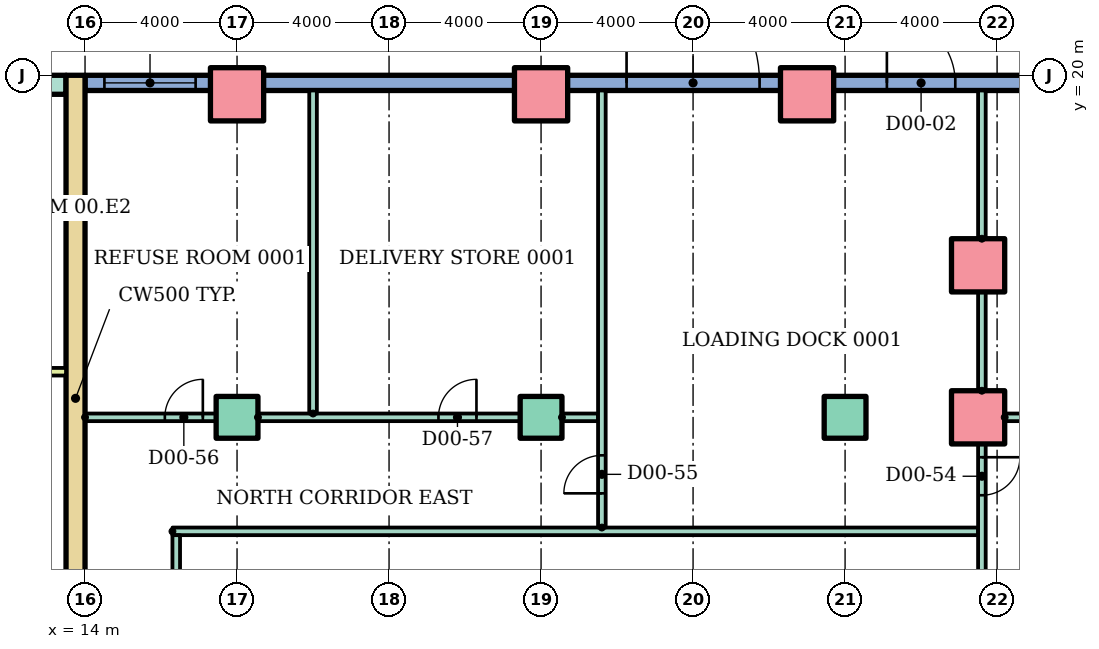
"""IFC4 building model, lengths in metres.
Left out: names, types, materials, properties, quantities, classifications, styles, units other than length and angle.
Written with IfcOpenShell. Run it as: python <this file> out.ifc"""

import sys

from ifc_helpers import new_model, si_unit, direction, frame, frame_2d, origin, origin_2d, place, context, subcontext, project, spatial, rectangle, hollow_rectangle, extrude, element, fill, save


model = new_model("IFC4")
c1 = context("Model", 3, precision=1e-05, world=origin(), true_north=direction((0.0, 1.0)))
c2 = subcontext(c1, "Body", "Model", "MODEL_VIEW")
j1 = project(units=[si_unit("LENGTHUNIT", "METRE"), si_unit("PLANEANGLEUNIT", "RADIAN")], contexts=[c1])
p1 = place(None, origin())
s1 = spatial("IfcSite", under=j1, at=p1, CompositionType="ELEMENT")
p2 = place(p1, origin())
s2 = spatial("IfcBuilding", under=s1, at=p2, CompositionType="ELEMENT")
p3 = place(p2, origin())
s3 = spatial("IfcBuildingStorey", under=s2, at=p3, CompositionType="ELEMENT", Elevation=0.0)
for number, where in (
    (1, (18.0, 11.0, 0.0)),
    (2, (26.0, 11.0, 0.0)),
    (3, (34.0, 11.0, 0.0)),
):
    element("IfcColumn", number, at=place(p3, frame(where)), inside=s3, PredefinedType="COLUMN", context=c2, shape_type="SweptSolid", body=[
        extrude(rectangle(XDim=1.1, YDim=1.1, at=origin_2d()), origin(), (0.0, 0.0, 1.0), 6.0),
    ])
for number, where in (
    (4, (37.5, 11.0, 0.0)),
    (5, (37.5, 15.0, 0.0)),
    (6, (18.0, 19.5, 0.0)),
    (7, (26.0, 19.5, 0.0)),
    (8, (33.0, 19.5, 0.0)),
):
    element("IfcColumn", number, at=place(p3, frame(where)), inside=s3, PredefinedType="COLUMN", context=c2, shape_type="SweptSolid", body=[
        extrude(hollow_rectangle(XDim=1.4, YDim=1.4, WallThickness=0.08, at=origin_2d()), origin(), (0.0, 0.0, 1.0), 6.0),
    ])
p4 = place(p3, frame((39.6, 19.8, 0.0), z_axis=(0.0, 0.0, 1.0), x_axis=(-1.0, 0.0, 0.0)))
e9 = element("IfcWall", 9, at=p4, inside=s3, PredefinedType="STANDARD", context=c2, shape_type="SweptSolid", body=[
    extrude(rectangle(XDim=25.6, YDim=0.4, at=frame_2d((12.8, 0.0))), origin(), (0.0, 0.0, 1.0), 5.7),
])
p5 = place(p4, frame((2.7, 0.0, 0.0)))
e10 = element("IfcOpeningElement", 10, at=p5, cuts=e9, PredefinedType="OPENING", context=c2, shape_type="SweptSolid", body=[
    extrude(rectangle(XDim=1.8, YDim=2.4, at=frame_2d((0.9, 1.2))), frame((0.0, 0.21, 0.0), z_axis=(0.0, -1.0, 0.0), x_axis=(1.0, 0.0, 0.0)), (0.0, 0.0, 1.0), 0.42),
])
p6 = place(p4, frame((22.69, 0.0, 0.9)))
e11 = element("IfcOpeningElement", 11, at=p6, cuts=e9, PredefinedType="OPENING", context=c2, shape_type="SweptSolid", body=[
    extrude(rectangle(XDim=2.4, YDim=2.4, at=frame_2d((1.2, 1.2))), frame((0.0, 0.21, 0.0), z_axis=(0.0, -1.0, 0.0), x_axis=(1.0, 0.0, 0.0)), (0.0, 0.0, 1.0), 0.42),
])
p7 = place(p4, frame((7.85, 0.0, 0.0)))
e12 = element("IfcOpeningElement", 12, at=p7, cuts=e9, PredefinedType="OPENING", context=c2, shape_type="SweptSolid", body=[
    extrude(rectangle(XDim=3.5, YDim=4.5, at=frame_2d((1.75, 2.25))), frame((0.0, 0.21, 0.0), z_axis=(0.0, -1.0, 0.0), x_axis=(1.0, 0.0, 0.0)), (0.0, 0.0, 1.0), 0.42),
])
p8 = place(p3, frame((13.75, 3.0, 0.0), z_axis=(0.0, 0.0, 1.0), x_axis=(0.0, 1.0, 0.0)))
e13 = element("IfcWall", 13, at=p8, inside=s3, PredefinedType="SHEAR", context=c2, shape_type="SweptSolid", body=[
    extrude(rectangle(XDim=17.0, YDim=0.5, at=frame_2d((8.5, 0.0))), origin(), (0.0, 0.0, 1.0), 5.7),
])
p9 = place(p3, frame((-13.5, 19.75, 0.0)))
e14 = element("IfcWall", 14, at=p9, inside=s3, PredefinedType="SHEAR", context=c2, shape_type="SweptSolid", body=[
    extrude(rectangle(XDim=27.0, YDim=0.5, at=frame_2d((13.5, 0.0))), origin(), (0.0, 0.0, 1.0), 5.7),
])
p10 = place(p9, frame((4.4, 0.0, 0.0)))
e15 = element("IfcOpeningElement", 15, at=p10, cuts=e14, PredefinedType="OPENING", context=c2, shape_type="SweptSolid", body=[
    extrude(rectangle(XDim=0.95, YDim=2.1, at=frame_2d((0.475, 1.05))), frame((0.0, 0.26, 0.0), z_axis=(0.0, -1.0, 0.0), x_axis=(1.0, 0.0, 0.0)), (0.0, 0.0, 1.0), 0.52),
])
p11 = place(p9, frame((10.4, 0.0, 0.0)))
e16 = element("IfcOpeningElement", 16, at=p11, cuts=e14, PredefinedType="OPENING", context=c2, shape_type="SweptSolid", body=[
    extrude(rectangle(XDim=0.95, YDim=2.1, at=frame_2d((0.475, 1.05))), frame((0.0, 0.26, 0.0), z_axis=(0.0, -1.0, 0.0), x_axis=(1.0, 0.0, 0.0)), (0.0, 0.0, 1.0), 0.52),
])
p12 = place(p9, frame((16.4, 0.0, 0.0)))
e17 = element("IfcOpeningElement", 17, at=p12, cuts=e14, PredefinedType="OPENING", context=c2, shape_type="SweptSolid", body=[
    extrude(rectangle(XDim=0.95, YDim=2.1, at=frame_2d((0.475, 1.05))), frame((0.0, 0.26, 0.0), z_axis=(0.0, -1.0, 0.0), x_axis=(1.0, 0.0, 0.0)), (0.0, 0.0, 1.0), 0.52),
])
p13 = place(p3, frame((9.6, 12.2, 0.0)))
e18 = element("IfcWall", 18, at=p13, inside=s3, PredefinedType="PARTITIONING", context=c2, shape_type="SweptSolid", body=[
    extrude(rectangle(XDim=3.9, YDim=0.2, at=frame_2d((1.95, 0.0))), origin(), (0.0, 0.0, 1.0), 5.7),
])
p14 = place(p3, frame((16.3, 8.0, 0.0)))
e19 = element("IfcWall", 19, at=p14, inside=s3, PredefinedType="PARTITIONING", context=c2, shape_type="SweptSolid", body=[
    extrude(rectangle(XDim=21.2, YDim=0.2, at=frame_2d((10.6, 0.0))), origin(), (0.0, 0.0, 1.0), 5.7),
])
p15 = place(p3, frame((14.0, 11.0, 0.0)))
e20 = element("IfcWall", 20, at=p15, inside=s3, PredefinedType="PARTITIONING", context=c2, shape_type="SweptSolid", body=[
    extrude(rectangle(XDim=3.45, YDim=0.2, at=frame_2d((1.725, 0.0))), origin(), (0.0, 0.0, 1.0), 5.7),
])
p16 = place(p15, frame((2.1, 0.0, 0.0)))
e21 = element("IfcOpeningElement", 21, at=p16, cuts=e20, PredefinedType="OPENING", context=c2, shape_type="SweptSolid", body=[
    extrude(rectangle(XDim=1.0, YDim=2.1, at=frame_2d((0.5, 1.05))), frame((0.0, 0.11, 0.0), z_axis=(0.0, -1.0, 0.0), x_axis=(1.0, 0.0, 0.0)), (0.0, 0.0, 1.0), 0.22),
])
p17 = place(p3, frame((18.55, 11.0, 0.0)))
e22 = element("IfcWall", 22, at=p17, inside=s3, PredefinedType="PARTITIONING", context=c2, shape_type="SweptSolid", body=[
    extrude(rectangle(XDim=6.9, YDim=0.2, at=frame_2d((3.45, 0.0))), origin(), (0.0, 0.0, 1.0), 5.7),
])
p18 = place(p17, frame((4.75, 0.0, 0.0)))
e23 = element("IfcOpeningElement", 23, at=p18, cuts=e22, PredefinedType="OPENING", context=c2, shape_type="SweptSolid", body=[
    extrude(rectangle(XDim=1.0, YDim=2.1, at=frame_2d((0.5, 1.05))), frame((0.0, 0.11, 0.0), z_axis=(0.0, -1.0, 0.0), x_axis=(1.0, 0.0, 0.0)), (0.0, 0.0, 1.0), 0.22),
])
p19 = place(p3, frame((26.55, 11.0, 0.0)))
e24 = element("IfcWall", 24, at=p19, inside=s3, PredefinedType="PARTITIONING", context=c2, shape_type="SweptSolid", body=[
    extrude(rectangle(XDim=0.95, YDim=0.2, at=frame_2d((0.475, 0.0))), origin(), (0.0, 0.0, 1.0), 5.7),
])
p20 = place(p3, frame((38.2, 11.0, 0.0)))
e25 = element("IfcWall", 25, at=p20, inside=s3, PredefinedType="PARTITIONING", context=c2, shape_type="SweptSolid", body=[
    extrude(rectangle(XDim=1.4, YDim=0.2, at=frame_2d((0.7, 0.0))), origin(), (0.0, 0.0, 1.0), 5.7),
])
p21 = place(p3, frame((16.4, 1.5, 0.0), z_axis=(0.0, 0.0, 1.0), x_axis=(0.0, 1.0, 0.0)))
e26 = element("IfcWall", 26, at=p21, inside=s3, PredefinedType="PARTITIONING", context=c2, shape_type="SweptSolid", body=[
    extrude(rectangle(XDim=6.4, YDim=0.2, at=frame_2d((3.2, 0.0))), origin(), (0.0, 0.0, 1.0), 5.7),
])
p22 = place(p3, frame((20.0, 11.1, 0.0), z_axis=(0.0, 0.0, 1.0), x_axis=(0.0, 1.0, 0.0)))
e27 = element("IfcWall", 27, at=p22, inside=s3, PredefinedType="PARTITIONING", context=c2, shape_type="SweptSolid", body=[
    extrude(rectangle(XDim=8.5, YDim=0.2, at=frame_2d((4.25, 0.0))), origin(), (0.0, 0.0, 1.0), 5.7),
])
p23 = place(p3, frame((27.6, 8.1, 0.0), z_axis=(0.0, 0.0, 1.0), x_axis=(0.0, 1.0, 0.0)))
e28 = element("IfcWall", 28, at=p23, inside=s3, PredefinedType="PARTITIONING", context=c2, shape_type="SweptSolid", body=[
    extrude(rectangle(XDim=11.5, YDim=0.2, at=frame_2d((5.75, 0.0))), origin(), (0.0, 0.0, 1.0), 5.7),
])
p24 = place(p23, frame((0.9, 0.0, 0.0)))
e29 = element("IfcOpeningElement", 29, at=p24, cuts=e28, PredefinedType="OPENING", context=c2, shape_type="SweptSolid", body=[
    extrude(rectangle(XDim=1.0, YDim=2.1, at=frame_2d((0.5, 1.05))), frame((0.0, 0.11, 0.0), z_axis=(0.0, -1.0, 0.0), x_axis=(1.0, 0.0, 0.0)), (0.0, 0.0, 1.0), 0.22),
])
p25 = place(p3, frame((37.6, 2.7, 0.0), z_axis=(0.0, 0.0, 1.0), x_axis=(0.0, 1.0, 0.0)))
e30 = element("IfcWall", 30, at=p25, inside=s3, PredefinedType="PARTITIONING", context=c2, shape_type="SweptSolid", body=[
    extrude(rectangle(XDim=7.6, YDim=0.2, at=frame_2d((3.8, 0.0))), origin(), (0.0, 0.0, 1.0), 5.7),
])
p26 = place(p25, frame((6.25, 0.0, 0.0)))
e31 = element("IfcOpeningElement", 31, at=p26, cuts=e30, PredefinedType="OPENING", context=c2, shape_type="SweptSolid", body=[
    extrude(rectangle(XDim=1.0, YDim=2.1, at=frame_2d((0.5, 1.05))), frame((0.0, 0.11, 0.0), z_axis=(0.0, -1.0, 0.0), x_axis=(1.0, 0.0, 0.0)), (0.0, 0.0, 1.0), 0.22),
])
p27 = place(p3, frame((37.6, 11.7, 0.0), z_axis=(0.0, 0.0, 1.0), x_axis=(0.0, 1.0, 0.0)))
e32 = element("IfcWall", 32, at=p27, inside=s3, PredefinedType="PARTITIONING", context=c2, shape_type="SweptSolid", body=[
    extrude(rectangle(XDim=2.6, YDim=0.2, at=frame_2d((1.3, 0.0))), origin(), (0.0, 0.0, 1.0), 5.7),
])
p28 = place(p3, frame((37.6, 15.7, 0.0), z_axis=(0.0, 0.0, 1.0), x_axis=(0.0, 1.0, 0.0)))
e33 = element("IfcWall", 33, at=p28, inside=s3, PredefinedType="PARTITIONING", context=c2, shape_type="SweptSolid", body=[
    extrude(rectangle(XDim=3.9, YDim=0.2, at=frame_2d((1.95, 0.0))), origin(), (0.0, 0.0, 1.0), 5.7),
])
p29 = place(p5, frame((1.8, 0.0, 0.0), z_axis=(0.0, 0.0, 1.0), x_axis=(-1.0, 0.0, 0.0)))
e34 = element("IfcDoor", 34, at=p29, inside=s3, OperationType="DOUBLE_DOOR_SINGLE_SWING", PredefinedType="DOOR", context=c2, shape_type="SweptSolid", body=[
    extrude(rectangle(XDim=1.8, YDim=2.4, at=frame_2d((0.9, 1.2))), frame((0.0, 0.025, 0.0), z_axis=(0.0, -1.0, 0.0), x_axis=(1.0, 0.0, 0.0)), (0.0, 0.0, 1.0), 0.05),
])
fill(e10, e34)
p30 = place(p6, origin())
e35 = element("IfcWindow", 35, at=p30, inside=s3, PartitioningType="SINGLE_PANEL", PredefinedType="WINDOW", context=c2, shape_type="SweptSolid", body=[
    extrude(rectangle(XDim=2.4, YDim=2.4, at=frame_2d((1.2, 1.2))), frame((0.0, 0.03, 0.0), z_axis=(0.0, -1.0, 0.0), x_axis=(1.0, 0.0, 0.0)), (0.0, 0.0, 1.0), 0.06),
])
fill(e11, e35)
p31 = place(p26, frame((1.0, 0.0, 0.0), z_axis=(0.0, 0.0, 1.0), x_axis=(-1.0, 0.0, 0.0)))
e36 = element("IfcDoor", 36, at=p31, inside=s3, OperationType="SINGLE_SWING_RIGHT", PredefinedType="DOOR", context=c2, shape_type="SweptSolid", body=[
    extrude(rectangle(XDim=1.0, YDim=2.1, at=frame_2d((0.5, 1.05))), frame((0.0, 0.025, 0.0), z_axis=(0.0, -1.0, 0.0), x_axis=(1.0, 0.0, 0.0)), (0.0, 0.0, 1.0), 0.05),
])
fill(e31, e36)
p32 = place(p24, origin())
e37 = element("IfcDoor", 37, at=p32, inside=s3, OperationType="SINGLE_SWING_LEFT", PredefinedType="DOOR", context=c2, shape_type="SweptSolid", body=[
    extrude(rectangle(XDim=1.0, YDim=2.1, at=frame_2d((0.5, 1.05))), frame((0.0, 0.025, 0.0), z_axis=(0.0, -1.0, 0.0), x_axis=(1.0, 0.0, 0.0)), (0.0, 0.0, 1.0), 0.05),
])
fill(e29, e37)
p33 = place(p16, origin())
e38 = element("IfcDoor", 38, at=p33, inside=s3, OperationType="SINGLE_SWING_RIGHT", PredefinedType="DOOR", context=c2, shape_type="SweptSolid", body=[
    extrude(rectangle(XDim=1.0, YDim=2.1, at=frame_2d((0.5, 1.05))), frame((0.0, 0.025, 0.0), z_axis=(0.0, -1.0, 0.0), x_axis=(1.0, 0.0, 0.0)), (0.0, 0.0, 1.0), 0.05),
])
fill(e21, e38)
p34 = place(p18, origin())
e39 = element("IfcDoor", 39, at=p34, inside=s3, OperationType="SINGLE_SWING_RIGHT", PredefinedType="DOOR", context=c2, shape_type="SweptSolid", body=[
    extrude(rectangle(XDim=1.0, YDim=2.1, at=frame_2d((0.5, 1.05))), frame((0.0, 0.025, 0.0), z_axis=(0.0, -1.0, 0.0), x_axis=(1.0, 0.0, 0.0)), (0.0, 0.0, 1.0), 0.05),
])
fill(e23, e39)
p35 = place(p7, frame((3.5, 0.0, 0.0), z_axis=(0.0, 0.0, 1.0), x_axis=(-1.0, 0.0, 0.0)))
e40 = element("IfcDoor", 40, at=p35, inside=s3, OperationType="DOUBLE_DOOR_SINGLE_SWING", PredefinedType="DOOR", context=c2, shape_type="SweptSolid", body=[
    extrude(rectangle(XDim=3.5, YDim=4.5, at=frame_2d((1.75, 2.25))), frame((0.0, 0.025, 0.0), z_axis=(0.0, -1.0, 0.0), x_axis=(1.0, 0.0, 0.0)), (0.0, 0.0, 1.0), 0.05),
])
fill(e12, e40)
save(model, sys.argv[1])
